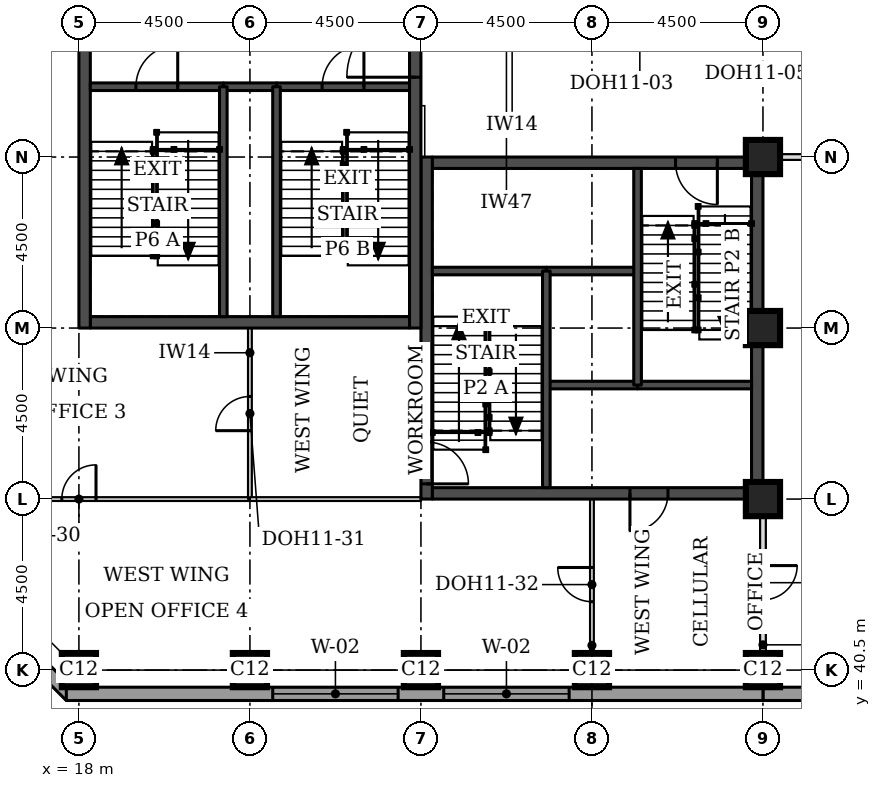
"""IFC4 building model, lengths in metres.
Left out: names, types, materials, properties, quantities, classifications, styles, units other than length and angle.
Written with IfcOpenShell. Run it as: python <this file> out.ifc"""

import sys

from ifc_helpers import new_model, si_unit, direction, frame, frame_2d, origin, origin_2d, place, context, subcontext, project, spatial, rectangle, extrude, element, fill, save


model = new_model("IFC4")
c1 = context("Model", 3, precision=1e-05, world=origin(), true_north=direction((0.0, 1.0)))
c2 = subcontext(c1, "Body", "Model", "MODEL_VIEW")
j1 = project(units=[si_unit("LENGTHUNIT", "METRE"), si_unit("PLANEANGLEUNIT", "RADIAN")], contexts=[c1])
p1 = place(None, origin())
s1 = spatial("IfcSite", under=j1, at=p1, CompositionType="ELEMENT")
p2 = place(p1, origin())
s2 = spatial("IfcBuilding", under=s1, at=p2, CompositionType="ELEMENT")
p3 = place(p2, frame((0.0, 0.0, 237.8)))
s3 = spatial("IfcBuildingStorey", under=s2, at=p3, CompositionType="ELEMENT", Elevation=237.8)
for number, where, z_axis, x_axis in (
    (1, (18.0, 40.5, 0.0), (0.0, 0.0, 1.0), (1.0, 0.0, 0.0)),
    (2, (22.5, 40.5, 0.0), (0.0, 0.0, 1.0), (1.0, 0.0, 0.0)),
    (3, (27.0, 40.5, 0.0), (0.0, 0.0, 1.0), (1.0, 0.0, 0.0)),
    (4, (31.5, 40.5, 0.0), (0.0, 0.0, 1.0), (1.0, 0.0, 0.0)),
    (5, (36.0, 40.5, 0.0), (0.0, 0.0, 1.0), (1.0, 0.0, 0.0)),
    (6, (36.0, 45.0, 0.0), (0.0, 0.0, 1.0), (1.0, 0.0, 0.0)),
    (7, (36.0, 49.5, 0.0), (0.0, 0.0, 1.0), (1.0, 0.0, 0.0)),
    (8, (36.0, 54.0, 0.0), (0.0, 0.0, 1.0), (1.0, 0.0, 0.0)),
):
    element("IfcColumn", number, at=place(p3, frame(where, z_axis=z_axis, x_axis=x_axis)), inside=s3, PredefinedType="COLUMN", context=c2, shape_type="SweptSolid", body=[
        extrude(rectangle(XDim=0.9, YDim=0.9, at=origin_2d()), origin(), (0.0, 0.0, 1.0), 3.7),
    ])
p4 = place(p3, frame((27.3, 45.15, 0.0), z_axis=(0.0, 0.0, 1.0), x_axis=(1.0, 0.0, 0.0)))
e9 = element("IfcWall", 9, at=p4, inside=s3, PredefinedType="SHEAR", context=c2, shape_type="SweptSolid", body=[
    extrude(rectangle(XDim=8.4, YDim=0.3, at=frame_2d((4.2, 0.0))), origin(), (0.0, 0.0, 1.0), 3.7),
])
p5 = place(p4, frame((5.2, 0.0, 0.0)))
e10 = element("IfcOpeningElement", 10, at=p5, cuts=e9, PredefinedType="OPENING", context=c2, shape_type="SweptSolid", body=[
    extrude(rectangle(XDim=1.0, YDim=2.1, at=frame_2d((0.5, 1.05))), frame((0.0, 0.16, 0.0), z_axis=(0.0, -1.0, 0.0), x_axis=(1.0, 0.0, 0.0)), (0.0, 0.0, 1.0), 0.32),
])
p6 = place(p3, frame((27.3, 53.85, 0.0), z_axis=(0.0, 0.0, 1.0), x_axis=(1.0, 0.0, 0.0)))
e11 = element("IfcWall", 11, at=p6, inside=s3, PredefinedType="SHEAR", context=c2, shape_type="SweptSolid", body=[
    extrude(rectangle(XDim=8.4, YDim=0.3, at=frame_2d((4.2, 0.0))), origin(), (0.0, 0.0, 1.0), 3.7),
])
p7 = place(p6, frame((6.4, 0.0, 0.0)))
e12 = element("IfcOpeningElement", 12, at=p7, cuts=e11, PredefinedType="OPENING", context=c2, shape_type="SweptSolid", body=[
    extrude(rectangle(XDim=1.1, YDim=2.1, at=frame_2d((0.55, 1.05))), frame((0.0, 0.16, 0.0), z_axis=(0.0, -1.0, 0.0), x_axis=(1.0, 0.0, 0.0)), (0.0, 0.0, 1.0), 0.32),
])
p8 = place(p3, frame((27.15, 45.0, 0.0), z_axis=(0.0, 0.0, 1.0), x_axis=(0.0, 1.0, 0.0)))
e13 = element("IfcWall", 13, at=p8, inside=s3, PredefinedType="SHEAR", context=c2, shape_type="SweptSolid", body=[
    extrude(rectangle(XDim=9.0, YDim=0.3, at=frame_2d((4.5, 0.0))), origin(), (0.0, 0.0, 1.0), 3.7),
])
p9 = place(p8, frame((0.4, 0.0, 0.0)))
e14 = element("IfcOpeningElement", 14, at=p9, cuts=e13, PredefinedType="OPENING", context=c2, shape_type="SweptSolid", body=[
    extrude(rectangle(XDim=1.1, YDim=2.1, at=frame_2d((0.55, 1.05))), frame((0.0, 0.16, 0.0), z_axis=(0.0, -1.0, 0.0), x_axis=(1.0, 0.0, 0.0)), (0.0, 0.0, 1.0), 0.32),
])
p10 = place(p3, frame((35.85, 45.0, 0.0), z_axis=(0.0, 0.0, 1.0), x_axis=(0.0, 1.0, 0.0)))
e15 = element("IfcWall", 15, at=p10, inside=s3, PredefinedType="SHEAR", context=c2, shape_type="SweptSolid", body=[
    extrude(rectangle(XDim=9.0, YDim=0.3, at=frame_2d((4.5, 0.0))), origin(), (0.0, 0.0, 1.0), 3.7),
])
p11 = place(p3, frame((18.3, 49.65, 0.0), z_axis=(0.0, 0.0, 1.0), x_axis=(1.0, 0.0, 0.0)))
e16 = element("IfcWall", 16, at=p11, inside=s3, PredefinedType="SHEAR", context=c2, shape_type="SweptSolid", body=[
    extrude(rectangle(XDim=8.4, YDim=0.3, at=frame_2d((4.2, 0.0))), origin(), (0.0, 0.0, 1.0), 3.7),
])
p12 = place(p3, frame((18.15, 49.5, 0.0), z_axis=(0.0, 0.0, 1.0), x_axis=(0.0, 1.0, 0.0)))
e17 = element("IfcWall", 17, at=p12, inside=s3, PredefinedType="SHEAR", context=c2, shape_type="SweptSolid", body=[
    extrude(rectangle(XDim=9.0, YDim=0.3, at=frame_2d((4.5, 0.0))), origin(), (0.0, 0.0, 1.0), 3.7),
])
p13 = place(p3, frame((26.85, 49.5, 0.0), z_axis=(0.0, 0.0, 1.0), x_axis=(0.0, 1.0, 0.0)))
e18 = element("IfcWall", 18, at=p13, inside=s3, PredefinedType="SHEAR", context=c2, shape_type="SweptSolid", body=[
    extrude(rectangle(XDim=9.0, YDim=0.3, at=frame_2d((4.5, 0.0))), origin(), (0.0, 0.0, 1.0), 3.7),
])
p14 = place(p13, frame((6.6, 0.0, 0.0)))
e19 = element("IfcOpeningElement", 19, at=p14, cuts=e18, PredefinedType="OPENING", context=c2, shape_type="SweptSolid", body=[
    extrude(rectangle(XDim=1.8, YDim=2.1, at=frame_2d((0.9, 1.05))), frame((0.0, 0.16, 0.0), z_axis=(0.0, -1.0, 0.0), x_axis=(1.0, 0.0, 0.0)), (0.0, 0.0, 1.0), 0.32),
])
p15 = place(p3, frame((36.0, 39.875, 0.0), z_axis=(0.0, 0.0, 1.0), x_axis=(1.0, 0.0, 0.0)))
e20 = element("IfcWall", 20, at=p15, inside=s3, PredefinedType="STANDARD", context=c2, shape_type="SweptSolid", body=[
    extrude(rectangle(XDim=36.331, YDim=0.35, at=frame_2d((18.166, 0.0))), origin(), (0.0, 0.0, 1.0), 3.525),
])
p16 = place(p15, frame((5.1, 0.0, 0.9)))
e21 = element("IfcOpeningElement", 21, at=p16, cuts=e20, PredefinedType="OPENING", context=c2, shape_type="SweptSolid", body=[
    extrude(rectangle(XDim=3.3, YDim=1.9, at=frame_2d((1.65, 0.95))), frame((0.0, 0.185, 0.0), z_axis=(0.0, -1.0, 0.0), x_axis=(1.0, 0.0, 0.0)), (0.0, 0.0, 1.0), 0.37),
])
p17 = place(p15, frame((9.6, 0.0, 0.9)))
e22 = element("IfcOpeningElement", 22, at=p17, cuts=e20, PredefinedType="OPENING", context=c2, shape_type="SweptSolid", body=[
    extrude(rectangle(XDim=3.3, YDim=1.9, at=frame_2d((1.65, 0.95))), frame((0.0, 0.185, 0.0), z_axis=(0.0, -1.0, 0.0), x_axis=(1.0, 0.0, 0.0)), (0.0, 0.0, 1.0), 0.37),
])
p18 = place(p15, frame((14.1, 0.0, 0.9)))
e23 = element("IfcOpeningElement", 23, at=p18, cuts=e20, PredefinedType="OPENING", context=c2, shape_type="SweptSolid", body=[
    extrude(rectangle(XDim=3.3, YDim=1.9, at=frame_2d((1.65, 0.95))), frame((0.0, 0.185, 0.0), z_axis=(0.0, -1.0, 0.0), x_axis=(1.0, 0.0, 0.0)), (0.0, 0.0, 1.0), 0.37),
])
p19 = place(p15, frame((18.6, 0.0, 0.9)))
e24 = element("IfcOpeningElement", 24, at=p19, cuts=e20, PredefinedType="OPENING", context=c2, shape_type="SweptSolid", body=[
    extrude(rectangle(XDim=3.3, YDim=1.9, at=frame_2d((1.65, 0.95))), frame((0.0, 0.185, 0.0), z_axis=(0.0, -1.0, 0.0), x_axis=(1.0, 0.0, 0.0)), (0.0, 0.0, 1.0), 0.37),
])
p20 = place(p15, frame((23.1, 0.0, 0.9)))
e25 = element("IfcOpeningElement", 25, at=p20, cuts=e20, PredefinedType="OPENING", context=c2, shape_type="SweptSolid", body=[
    extrude(rectangle(XDim=3.3, YDim=1.9, at=frame_2d((1.65, 0.95))), frame((0.0, 0.185, 0.0), z_axis=(0.0, -1.0, 0.0), x_axis=(1.0, 0.0, 0.0)), (0.0, 0.0, 1.0), 0.37),
])
p21 = place(p15, frame((27.6, 0.0, 0.9)))
e26 = element("IfcOpeningElement", 26, at=p21, cuts=e20, PredefinedType="OPENING", context=c2, shape_type="SweptSolid", body=[
    extrude(rectangle(XDim=3.3, YDim=1.9, at=frame_2d((1.65, 0.95))), frame((0.0, 0.185, 0.0), z_axis=(0.0, -1.0, 0.0), x_axis=(1.0, 0.0, 0.0)), (0.0, 0.0, 1.0), 0.37),
])
p22 = place(p3, frame((12.824, 44.792, 0.0), z_axis=(0.0, 0.0, 1.0), x_axis=(0.707106781187, -0.707106781187, 0.0)))
e27 = element("IfcWall", 27, at=p22, inside=s3, PredefinedType="STANDARD", context=c2, shape_type="SweptSolid", body=[
    extrude(rectangle(XDim=7.027, YDim=0.35, at=frame_2d((3.513, 0.0))), origin(), (0.0, 0.0, 1.0), 3.525),
])
p23 = place(p22, frame((1.863, 0.0, 0.9)))
e28 = element("IfcOpeningElement", 28, at=p23, cuts=e27, PredefinedType="OPENING", context=c2, shape_type="SweptSolid", body=[
    extrude(rectangle(XDim=3.3, YDim=1.9, at=frame_2d((1.65, 0.95))), frame((0.0, 0.185, 0.0), z_axis=(0.0, -1.0, 0.0), x_axis=(1.0, 0.0, 0.0)), (0.0, 0.0, 1.0), 0.37),
])
p24 = place(p3, frame((17.669, 39.875, 0.0), z_axis=(0.0, 0.0, 1.0), x_axis=(1.0, 0.0, 0.0)))
e29 = element("IfcWall", 29, at=p24, inside=s3, PredefinedType="STANDARD", context=c2, shape_type="SweptSolid", body=[
    extrude(rectangle(XDim=18.331, YDim=0.35, at=frame_2d((9.166, 0.0))), origin(), (0.0, 0.0, 1.0), 3.525),
])
p25 = place(p24, frame((5.431, 0.0, 0.9)))
e30 = element("IfcOpeningElement", 30, at=p25, cuts=e29, PredefinedType="OPENING", context=c2, shape_type="SweptSolid", body=[
    extrude(rectangle(XDim=3.3, YDim=1.9, at=frame_2d((1.65, 0.95))), frame((0.0, 0.185, 0.0), z_axis=(0.0, -1.0, 0.0), x_axis=(1.0, 0.0, 0.0)), (0.0, 0.0, 1.0), 0.37),
])
p26 = place(p24, frame((9.931, 0.0, 0.9)))
e31 = element("IfcOpeningElement", 31, at=p26, cuts=e29, PredefinedType="OPENING", context=c2, shape_type="SweptSolid", body=[
    extrude(rectangle(XDim=3.3, YDim=1.9, at=frame_2d((1.65, 0.95))), frame((0.0, 0.185, 0.0), z_axis=(0.0, -1.0, 0.0), x_axis=(1.0, 0.0, 0.0)), (0.0, 0.0, 1.0), 0.37),
])
p27 = place(p3, frame((36.45, 54.0, 0.0), z_axis=(0.0, 0.0, 1.0), x_axis=(1.0, 0.0, 0.0)))
e32 = element("IfcWall", 32, at=p27, inside=s3, PredefinedType="PARTITIONING", context=c2, shape_type="SweptSolid", body=[
    extrude(rectangle(XDim=5.625, YDim=0.15, at=frame_2d((2.812, 0.0))), origin(), (0.0, 0.0, 1.0), 3.55),
])
p28 = place(p3, frame((36.0, 40.95, 0.0), z_axis=(0.0, 0.0, 1.0), x_axis=(0.0, 1.0, 0.0)))
e33 = element("IfcWall", 33, at=p28, inside=s3, PredefinedType="PARTITIONING", context=c2, shape_type="SweptSolid", body=[
    extrude(rectangle(XDim=3.63, YDim=0.15, at=frame_2d((1.815, 0.0))), origin(), (0.0, 0.0, 1.0), 2.8),
])
p29 = place(p28, frame((1.4, 0.0, 0.0)))
e34 = element("IfcOpeningElement", 34, at=p29, cuts=e33, PredefinedType="OPENING", context=c2, shape_type="SweptSolid", body=[
    extrude(rectangle(XDim=0.9, YDim=2.1, at=frame_2d((0.45, 1.05))), frame((0.0, 0.085, 0.0), z_axis=(0.0, -1.0, 0.0), x_axis=(1.0, 0.0, 0.0)), (0.0, 0.0, 1.0), 0.17),
])
p30 = place(p3, frame((22.5, 45.0, 0.0), z_axis=(0.0, 0.0, 1.0), x_axis=(-1.0, 0.0, 0.0)))
e35 = element("IfcWall", 35, at=p30, inside=s3, PredefinedType="PARTITIONING", context=c2, shape_type="SweptSolid", body=[
    extrude(rectangle(XDim=9.0, YDim=0.1, at=frame_2d((4.5, 0.0))), origin(), (0.0, 0.0, 1.0), 2.55),
])
p31 = place(p30, frame((4.05, 0.0, 0.0)))
e36 = element("IfcOpeningElement", 36, at=p31, cuts=e35, PredefinedType="OPENING", context=c2, shape_type="SweptSolid", body=[
    extrude(rectangle(XDim=0.9, YDim=2.1, at=frame_2d((0.45, 1.05))), frame((0.0, 0.06, 0.0), z_axis=(0.0, -1.0, 0.0), x_axis=(1.0, 0.0, 0.0)), (0.0, 0.0, 1.0), 0.12),
])
p32 = place(p3, frame((22.5, 49.5, 0.0), z_axis=(0.0, 0.0, 1.0), x_axis=(0.0, -1.0, 0.0)))
e37 = element("IfcWall", 37, at=p32, inside=s3, PredefinedType="PARTITIONING", context=c2, shape_type="SweptSolid", body=[
    extrude(rectangle(XDim=4.5, YDim=0.1, at=frame_2d((2.25, 0.0))), origin(), (0.0, 0.0, 1.0), 3.55),
])
p33 = place(p32, frame((1.8, 0.0, 0.0)))
e38 = element("IfcOpeningElement", 38, at=p33, cuts=e37, PredefinedType="OPENING", context=c2, shape_type="SweptSolid", body=[
    extrude(rectangle(XDim=0.9, YDim=2.1, at=frame_2d((0.45, 1.05))), frame((0.0, 0.06, 0.0), z_axis=(0.0, -1.0, 0.0), x_axis=(1.0, 0.0, 0.0)), (0.0, 0.0, 1.0), 0.12),
])
p34 = place(p3, frame((22.5, 45.0, 0.0), z_axis=(0.0, 0.0, 1.0), x_axis=(1.0, 0.0, 0.0)))
e39 = element("IfcWall", 39, at=p34, inside=s3, PredefinedType="PARTITIONING", context=c2, shape_type="SweptSolid", body=[
    extrude(rectangle(XDim=4.5, YDim=0.1, at=frame_2d((2.25, 0.0))), origin(), (0.0, 0.0, 1.0), 2.55),
])
p35 = place(p3, frame((31.5, 45.0, 0.0), z_axis=(0.0, 0.0, 1.0), x_axis=(0.0, -1.0, 0.0)))
e40 = element("IfcWall", 40, at=p35, inside=s3, PredefinedType="PARTITIONING", context=c2, shape_type="SweptSolid", body=[
    extrude(rectangle(XDim=4.5, YDim=0.1, at=frame_2d((2.25, 0.0))), origin(), (0.0, 0.0, 1.0), 3.55),
])
p36 = place(p35, frame((1.8, 0.0, 0.0)))
e41 = element("IfcOpeningElement", 41, at=p36, cuts=e40, PredefinedType="OPENING", context=c2, shape_type="SweptSolid", body=[
    extrude(rectangle(XDim=0.9, YDim=2.1, at=frame_2d((0.45, 1.05))), frame((0.0, 0.06, 0.0), z_axis=(0.0, -1.0, 0.0), x_axis=(1.0, 0.0, 0.0)), (0.0, 0.0, 1.0), 0.12),
])
p37 = place(p3, frame((30.3, 48.0, 0.0), z_axis=(0.0, 0.0, 1.0), x_axis=(1.0, 0.0, 0.0)))
e42 = element("IfcWall", 42, at=p37, inside=s3, PredefinedType="SOLIDWALL", context=c2, shape_type="SweptSolid", body=[
    extrude(rectangle(XDim=2.4, YDim=0.2, at=frame_2d((1.2, 0.0))), origin(), (0.0, 0.0, 1.0), 3.55),
])
p38 = place(p3, frame((32.7, 48.0, 0.0), z_axis=(0.0, 0.0, 1.0), x_axis=(1.0, 0.0, 0.0)))
e43 = element("IfcWall", 43, at=p38, inside=s3, PredefinedType="SOLIDWALL", context=c2, shape_type="SweptSolid", body=[
    extrude(rectangle(XDim=3.0, YDim=0.2, at=frame_2d((1.5, 0.0))), origin(), (0.0, 0.0, 1.0), 3.55),
])
p39 = place(p3, frame((30.3, 51.0, 0.0), z_axis=(0.0, 0.0, 1.0), x_axis=(1.0, 0.0, 0.0)))
e44 = element("IfcWall", 44, at=p39, inside=s3, PredefinedType="SOLIDWALL", context=c2, shape_type="SweptSolid", body=[
    extrude(rectangle(XDim=2.4, YDim=0.2, at=frame_2d((1.2, 0.0))), origin(), (0.0, 0.0, 1.0), 3.7),
])
p40 = place(p3, frame((27.3, 51.0, 0.0), z_axis=(0.0, 0.0, 1.0), x_axis=(1.0, 0.0, 0.0)))
e45 = element("IfcWall", 45, at=p40, inside=s3, PredefinedType="SOLIDWALL", context=c2, shape_type="SweptSolid", body=[
    extrude(rectangle(XDim=3.0, YDim=0.2, at=frame_2d((1.5, 0.0))), origin(), (0.0, 0.0, 1.0), 3.55),
])
for number, where, z_axis, x_axis in (
    (46, (30.3, 45.3, 0.0), (0.0, 0.0, 1.0), (0.0, 1.0, 0.0)),
    (47, (32.7, 48.0, 0.0), (0.0, 0.0, 1.0), (0.0, 1.0, 0.0)),
):
    element("IfcWall", number, at=place(p3, frame(where, z_axis=z_axis, x_axis=x_axis)), inside=s3, PredefinedType="SOLIDWALL", context=c2, shape_type="SweptSolid", body=[
        extrude(rectangle(XDim=5.7, YDim=0.2, at=frame_2d((2.85, 0.0))), origin(), (0.0, 0.0, 1.0), 3.55),
    ])
p41 = place(p3, frame((21.8, 55.85, 0.0), z_axis=(0.0, 0.0, 1.0), x_axis=(1.0, 0.0, 0.0)))
e48 = element("IfcWall", 48, at=p41, inside=s3, PredefinedType="SOLIDWALL", context=c2, shape_type="SweptSolid", body=[
    extrude(rectangle(XDim=1.4, YDim=0.2, at=frame_2d((0.7, 0.0))), origin(), (0.0, 0.0, 1.0), 3.55),
])
p42 = place(p3, frame((18.3, 55.85, 0.0), z_axis=(0.0, 0.0, 1.0), x_axis=(1.0, 0.0, 0.0)))
e49 = element("IfcWall", 49, at=p42, inside=s3, PredefinedType="SOLIDWALL", context=c2, shape_type="SweptSolid", body=[
    extrude(rectangle(XDim=3.5, YDim=0.2, at=frame_2d((1.75, 0.0))), origin(), (0.0, 0.0, 1.0), 3.55),
])
p43 = place(p42, frame((1.2, 0.0, 0.0)))
e50 = element("IfcOpeningElement", 50, at=p43, cuts=e49, PredefinedType="OPENING", context=c2, shape_type="SweptSolid", body=[
    extrude(rectangle(XDim=1.1, YDim=2.1, at=frame_2d((0.55, 1.05))), frame((0.0, 0.11, 0.0), z_axis=(0.0, -1.0, 0.0), x_axis=(1.0, 0.0, 0.0)), (0.0, 0.0, 1.0), 0.22),
])
p44 = place(p3, frame((23.2, 55.85, 0.0), z_axis=(0.0, 0.0, 1.0), x_axis=(1.0, 0.0, 0.0)))
e51 = element("IfcWall", 51, at=p44, inside=s3, PredefinedType="SOLIDWALL", context=c2, shape_type="SweptSolid", body=[
    extrude(rectangle(XDim=3.5, YDim=0.2, at=frame_2d((1.75, 0.0))), origin(), (0.0, 0.0, 1.0), 3.55),
])
p45 = place(p44, frame((1.2, 0.0, 0.0)))
e52 = element("IfcOpeningElement", 52, at=p45, cuts=e51, PredefinedType="OPENING", context=c2, shape_type="SweptSolid", body=[
    extrude(rectangle(XDim=1.1, YDim=2.1, at=frame_2d((0.55, 1.05))), frame((0.0, 0.11, 0.0), z_axis=(0.0, -1.0, 0.0), x_axis=(1.0, 0.0, 0.0)), (0.0, 0.0, 1.0), 0.22),
])
for number, where, z_axis, x_axis in (
    (53, (21.8, 49.8, 0.0), (0.0, 0.0, 1.0), (0.0, 1.0, 0.0)),
    (54, (23.2, 49.8, 0.0), (0.0, 0.0, 1.0), (0.0, 1.0, 0.0)),
):
    element("IfcWall", number, at=place(p3, frame(where, z_axis=z_axis, x_axis=x_axis)), inside=s3, PredefinedType="SOLIDWALL", context=c2, shape_type="SweptSolid", body=[
        extrude(rectangle(XDim=6.05, YDim=0.2, at=frame_2d((3.025, 0.0))), origin(), (0.0, 0.0, 1.0), 3.55),
    ])
p46 = place(p25, origin())
e55 = element("IfcWindow", 55, at=p46, inside=s3, PartitioningType="SINGLE_PANEL", PredefinedType="WINDOW", context=c2, shape_type="SweptSolid", body=[
    extrude(rectangle(XDim=3.3, YDim=1.9, at=frame_2d((1.65, 0.95))), frame((0.0, 0.085, 0.0), z_axis=(0.0, -1.0, 0.0), x_axis=(1.0, 0.0, 0.0)), (0.0, 0.0, 1.0), 0.06),
])
fill(e30, e55)
p47 = place(p26, origin())
e56 = element("IfcWindow", 56, at=p47, inside=s3, PartitioningType="SINGLE_PANEL", PredefinedType="WINDOW", context=c2, shape_type="SweptSolid", body=[
    extrude(rectangle(XDim=3.3, YDim=1.9, at=frame_2d((1.65, 0.95))), frame((0.0, 0.085, 0.0), z_axis=(0.0, -1.0, 0.0), x_axis=(1.0, 0.0, 0.0)), (0.0, 0.0, 1.0), 0.06),
])
fill(e31, e56)
p48 = place(p29, frame((0.9, 0.0, 0.0), z_axis=(0.0, 0.0, 1.0), x_axis=(-1.0, 0.0, 0.0)))
e57 = element("IfcDoor", 57, at=p48, inside=s3, OperationType="SINGLE_SWING_LEFT", PredefinedType="DOOR", context=c2, shape_type="SweptSolid", body=[
    extrude(rectangle(XDim=0.9, YDim=2.1, at=frame_2d((0.45, 1.05))), frame((0.0, 0.025, 0.0), z_axis=(0.0, -1.0, 0.0), x_axis=(1.0, 0.0, 0.0)), (0.0, 0.0, 1.0), 0.05),
])
fill(e34, e57)
p49 = place(p31, frame((0.9, 0.0, 0.0), z_axis=(0.0, 0.0, 1.0), x_axis=(-1.0, 0.0, 0.0)))
e58 = element("IfcDoor", 58, at=p49, inside=s3, OperationType="SINGLE_SWING_RIGHT", PredefinedType="DOOR", context=c2, shape_type="SweptSolid", body=[
    extrude(rectangle(XDim=0.9, YDim=2.1, at=frame_2d((0.45, 1.05))), frame((0.0, 0.025, 0.0), z_axis=(0.0, -1.0, 0.0), x_axis=(1.0, 0.0, 0.0)), (0.0, 0.0, 1.0), 0.05),
])
fill(e36, e58)
p50 = place(p33, frame((0.9, 0.0, 0.0), z_axis=(0.0, 0.0, 1.0), x_axis=(-1.0, 0.0, 0.0)))
e59 = element("IfcDoor", 59, at=p50, inside=s3, OperationType="SINGLE_SWING_LEFT", PredefinedType="DOOR", context=c2, shape_type="SweptSolid", body=[
    extrude(rectangle(XDim=0.9, YDim=2.1, at=frame_2d((0.45, 1.05))), frame((0.0, 0.025, 0.0), z_axis=(0.0, -1.0, 0.0), x_axis=(1.0, 0.0, 0.0)), (0.0, 0.0, 1.0), 0.05),
])
fill(e38, e59)
p51 = place(p36, frame((0.9, 0.0, 0.0), z_axis=(0.0, 0.0, 1.0), x_axis=(-1.0, 0.0, 0.0)))
e60 = element("IfcDoor", 60, at=p51, inside=s3, OperationType="SINGLE_SWING_RIGHT", PredefinedType="DOOR", context=c2, shape_type="SweptSolid", body=[
    extrude(rectangle(XDim=0.9, YDim=2.1, at=frame_2d((0.45, 1.05))), frame((0.0, 0.025, 0.0), z_axis=(0.0, -1.0, 0.0), x_axis=(1.0, 0.0, 0.0)), (0.0, 0.0, 1.0), 0.05),
])
fill(e41, e60)
p52 = place(p9, frame((1.1, 0.0, 0.0), z_axis=(0.0, 0.0, 1.0), x_axis=(-1.0, 0.0, 0.0)))
e61 = element("IfcDoor", 61, at=p52, inside=s3, OperationType="SINGLE_SWING_RIGHT", PredefinedType="DOOR", context=c2, shape_type="SweptSolid", body=[
    extrude(rectangle(XDim=1.1, YDim=2.1, at=frame_2d((0.55, 1.05))), frame((0.0, 0.025, 0.0), z_axis=(0.0, -1.0, 0.0), x_axis=(1.0, 0.0, 0.0)), (0.0, 0.0, 1.0), 0.05),
])
fill(e14, e61)
p53 = place(p7, frame((1.1, 0.0, 0.0), z_axis=(0.0, 0.0, 1.0), x_axis=(-1.0, 0.0, 0.0)))
e62 = element("IfcDoor", 62, at=p53, inside=s3, OperationType="SINGLE_SWING_LEFT", PredefinedType="DOOR", context=c2, shape_type="SweptSolid", body=[
    extrude(rectangle(XDim=1.1, YDim=2.1, at=frame_2d((0.55, 1.05))), frame((0.0, 0.025, 0.0), z_axis=(0.0, -1.0, 0.0), x_axis=(1.0, 0.0, 0.0)), (0.0, 0.0, 1.0), 0.05),
])
fill(e12, e62)
p54 = place(p5, frame((1.0, 0.0, 0.0), z_axis=(0.0, 0.0, 1.0), x_axis=(-1.0, 0.0, 0.0)))
e63 = element("IfcDoor", 63, at=p54, inside=s3, OperationType="SINGLE_SWING_RIGHT", PredefinedType="DOOR", context=c2, shape_type="SweptSolid", body=[
    extrude(rectangle(XDim=1.0, YDim=2.1, at=frame_2d((0.5, 1.05))), frame((0.0, 0.025, 0.0), z_axis=(0.0, -1.0, 0.0), x_axis=(1.0, 0.0, 0.0)), (0.0, 0.0, 1.0), 0.05),
])
fill(e10, e63)
p55 = place(p43, origin())
e64 = element("IfcDoor", 64, at=p55, inside=s3, OperationType="SINGLE_SWING_RIGHT", PredefinedType="DOOR", context=c2, shape_type="SweptSolid", body=[
    extrude(rectangle(XDim=1.1, YDim=2.1, at=frame_2d((0.55, 1.05))), frame((0.0, 0.025, 0.0), z_axis=(0.0, -1.0, 0.0), x_axis=(1.0, 0.0, 0.0)), (0.0, 0.0, 1.0), 0.05),
])
fill(e50, e64)
p56 = place(p45, origin())
e65 = element("IfcDoor", 65, at=p56, inside=s3, OperationType="SINGLE_SWING_RIGHT", PredefinedType="DOOR", context=c2, shape_type="SweptSolid", body=[
    extrude(rectangle(XDim=1.1, YDim=2.1, at=frame_2d((0.55, 1.05))), frame((0.0, 0.025, 0.0), z_axis=(0.0, -1.0, 0.0), x_axis=(1.0, 0.0, 0.0)), (0.0, 0.0, 1.0), 0.05),
])
fill(e52, e65)
p57 = place(p14, origin())
e66 = element("IfcDoor", 66, at=p57, inside=s3, OperationType="SINGLE_SWING_LEFT", PredefinedType="DOOR", context=c2, shape_type="SweptSolid", body=[
    extrude(rectangle(XDim=1.8, YDim=2.1, at=frame_2d((0.9, 1.05))), frame((0.0, 0.025, 0.0), z_axis=(0.0, -1.0, 0.0), x_axis=(1.0, 0.0, 0.0)), (0.0, 0.0, 1.0), 0.05),
])
fill(e19, e66)
save(model, sys.argv[1])
